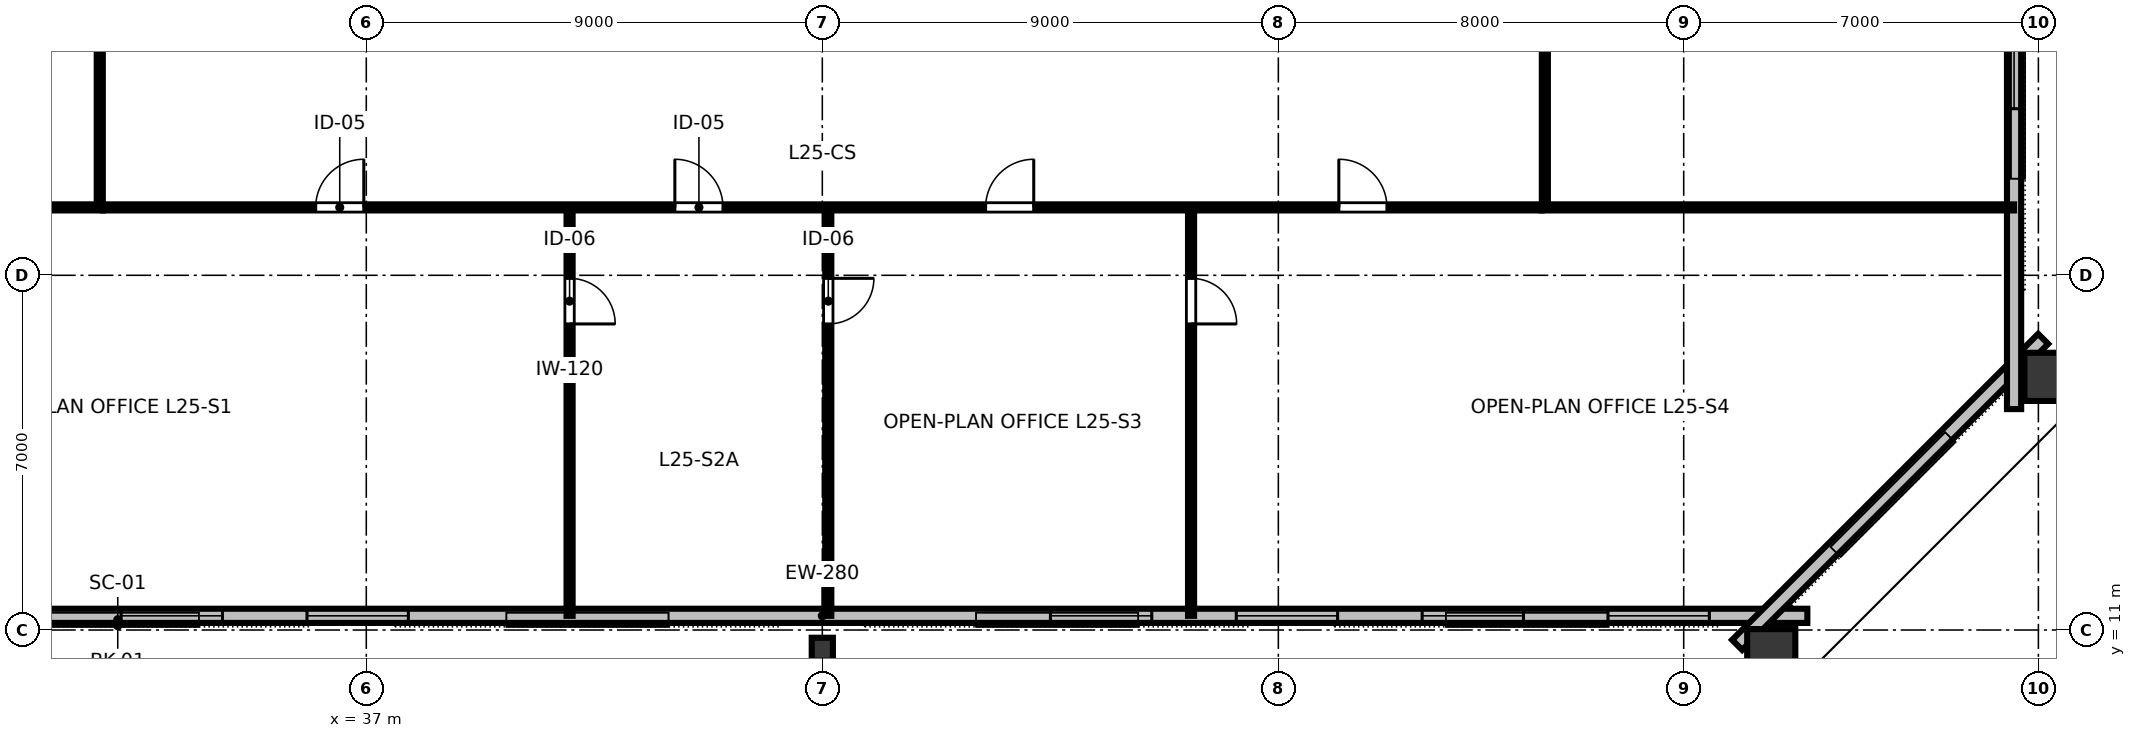
"""IFC4 building model, lengths in metres.
Left out: names, types, materials, properties, quantities, classifications, styles, units other than length and angle.
Written with IfcOpenShell. Run it as: python <this file> out.ifc"""

import sys

from ifc_helpers import new_model, si_unit, direction, frame, frame_2d, origin, origin_2d, place, context, subcontext, project, spatial, rectangle, hollow_rectangle, i_section, extrude, element, fill, save


model = new_model("IFC4")
c1 = context("Model", 3, precision=1e-05, world=origin(), true_north=direction((0.0, 1.0)))
c2 = subcontext(c1, "Body", "Model", "MODEL_VIEW")
j1 = project(units=[si_unit("LENGTHUNIT", "METRE"), si_unit("PLANEANGLEUNIT", "RADIAN")], contexts=[c1])
p1 = place(None, origin())
s1 = spatial("IfcSite", under=j1, at=p1, CompositionType="ELEMENT")
p2 = place(p1, origin())
s2 = spatial("IfcBuilding", under=s1, at=p2, CompositionType="ELEMENT")
p3 = place(p2, frame((0.0, 0.0, 98.8)))
s3 = spatial("IfcBuildingStorey", under=s2, at=p3, CompositionType="ELEMENT", Elevation=98.8)
p4 = place(p3, frame((46.0, 10.62, 0.0), z_axis=(0.0, 0.0, 1.0), x_axis=(1.0, 0.0, 0.0)))
e1 = element("IfcColumn", 1, at=p4, inside=s3, PredefinedType="COLUMN", context=c2, shape_type="SweptSolid", body=[
    extrude(i_section(OverallWidth=0.418, OverallDepth=0.455, WebThickness=0.042, FlangeThickness=0.068, FilletRadius=0.025, at=origin_2d()), origin(), (0.0, 0.0, 1.0), 3.358),
])
for number, where, z_axis, x_axis in (
    (2, (64.728, 10.444, 0.0), (0.0, 0.0, 1.0), (1.0, 0.0, 0.0)),
    (3, (70.299, 15.996, 0.0), (0.0, 0.0, 1.0), (0.0, 1.0, 0.0)),
):
    element("IfcColumn", number, at=place(p3, frame(where, z_axis=z_axis, x_axis=x_axis)), inside=s3, PredefinedType="COLUMN", context=c2, shape_type="SweptSolid", body=[
        extrude(hollow_rectangle(XDim=0.95, YDim=1.15, WallThickness=0.06, at=origin_2d()), origin(), (0.0, 0.0, 1.0), 3.358),
    ])
p5 = place(p3, frame((26.56, 11.28, 0.0), z_axis=(0.0, 0.0, 1.0), x_axis=(1.0, 0.0, 0.0)))
e4 = element("IfcWall", 4, at=p5, inside=s3, PredefinedType="STANDARD", context=c2, shape_type="SweptSolid", body=[
    extrude(rectangle(XDim=38.88, YDim=0.28, at=frame_2d((19.44, 0.0))), origin(), (0.0, 0.0, 1.0), 3.36),
])
p6 = place(p5, frame((1.934, 0.0, 0.8)))
e5 = element("IfcOpeningElement", 5, at=p6, cuts=e4, PredefinedType="OPENING", context=c2, shape_type="SweptSolid", body=[
    extrude(rectangle(XDim=2.0, YDim=1.95, at=frame_2d((1.0, 0.975))), frame((0.0, 0.15, 0.0), z_axis=(0.0, -1.0, 0.0), x_axis=(1.0, 0.0, 0.0)), (0.0, 0.0, 1.0), 0.3),
])
p7 = place(p5, frame((5.602, 0.0, 0.8)))
e6 = element("IfcOpeningElement", 6, at=p7, cuts=e4, PredefinedType="OPENING", context=c2, shape_type="SweptSolid", body=[
    extrude(rectangle(XDim=2.0, YDim=1.95, at=frame_2d((1.0, 0.975))), frame((0.0, 0.15, 0.0), z_axis=(0.0, -1.0, 0.0), x_axis=(1.0, 0.0, 0.0)), (0.0, 0.0, 1.0), 0.3),
])
p8 = place(p5, frame((9.27, 0.0, 0.8)))
e7 = element("IfcOpeningElement", 7, at=p8, cuts=e4, PredefinedType="OPENING", context=c2, shape_type="SweptSolid", body=[
    extrude(rectangle(XDim=2.0, YDim=1.95, at=frame_2d((1.0, 0.975))), frame((0.0, 0.15, 0.0), z_axis=(0.0, -1.0, 0.0), x_axis=(1.0, 0.0, 0.0)), (0.0, 0.0, 1.0), 0.3),
])
p9 = place(p5, frame((23.942, 0.0, 0.8)))
e8 = element("IfcOpeningElement", 8, at=p9, cuts=e4, PredefinedType="OPENING", context=c2, shape_type="SweptSolid", body=[
    extrude(rectangle(XDim=2.0, YDim=1.95, at=frame_2d((1.0, 0.975))), frame((0.0, 0.15, 0.0), z_axis=(0.0, -1.0, 0.0), x_axis=(1.0, 0.0, 0.0)), (0.0, 0.0, 1.0), 0.3),
])
p10 = place(p5, frame((27.61, 0.0, 0.8)))
e9 = element("IfcOpeningElement", 9, at=p10, cuts=e4, PredefinedType="OPENING", context=c2, shape_type="SweptSolid", body=[
    extrude(rectangle(XDim=2.0, YDim=1.95, at=frame_2d((1.0, 0.975))), frame((0.0, 0.15, 0.0), z_axis=(0.0, -1.0, 0.0), x_axis=(1.0, 0.0, 0.0)), (0.0, 0.0, 1.0), 0.3),
])
p11 = place(p5, frame((31.278, 0.0, 0.8)))
e10 = element("IfcOpeningElement", 10, at=p11, cuts=e4, PredefinedType="OPENING", context=c2, shape_type="SweptSolid", body=[
    extrude(rectangle(XDim=2.0, YDim=1.95, at=frame_2d((1.0, 0.975))), frame((0.0, 0.15, 0.0), z_axis=(0.0, -1.0, 0.0), x_axis=(1.0, 0.0, 0.0)), (0.0, 0.0, 1.0), 0.3),
])
p12 = place(p5, frame((34.946, 0.0, 0.8)))
e11 = element("IfcOpeningElement", 11, at=p12, cuts=e4, PredefinedType="OPENING", context=c2, shape_type="SweptSolid", body=[
    extrude(rectangle(XDim=2.0, YDim=1.95, at=frame_2d((1.0, 0.975))), frame((0.0, 0.15, 0.0), z_axis=(0.0, -1.0, 0.0), x_axis=(1.0, 0.0, 0.0)), (0.0, 0.0, 1.0), 0.3),
])
p13 = place(p3, frame((64.054, 10.706, 0.0), z_axis=(0.0, 0.0, 1.0), x_axis=(0.707106781187, 0.707106781187, 0.0)))
e12 = element("IfcWall", 12, at=p13, inside=s3, PredefinedType="STANDARD", context=c2, shape_type="SweptSolid", body=[
    extrude(rectangle(XDim=8.541, YDim=0.28, at=frame_2d((4.271, 0.0))), origin(), (0.0, 0.0, 1.0), 3.36),
])
p14 = place(p3, frame((69.52, 15.36, 0.0), z_axis=(0.0, 0.0, 1.0), x_axis=(0.0, 1.0, 0.0)))
e13 = element("IfcWall", 13, at=p14, inside=s3, PredefinedType="STANDARD", context=c2, shape_type="SweptSolid", body=[
    extrude(rectangle(XDim=33.28, YDim=0.28, at=frame_2d((16.64, 0.0))), origin(), (0.0, 0.0, 1.0), 3.36),
])
p15 = place(p14, frame((5.927, 0.0, 0.8)))
e14 = element("IfcOpeningElement", 14, at=p15, cuts=e13, PredefinedType="OPENING", context=c2, shape_type="SweptSolid", body=[
    extrude(rectangle(XDim=2.0, YDim=1.95, at=frame_2d((1.0, 0.975))), frame((0.0, 0.15, 0.0), z_axis=(0.0, -1.0, 0.0), x_axis=(1.0, 0.0, 0.0)), (0.0, 0.0, 1.0), 0.3),
])
p16 = place(p14, frame((9.812, 0.0, 0.8)))
e15 = element("IfcOpeningElement", 15, at=p16, cuts=e13, PredefinedType="OPENING", context=c2, shape_type="SweptSolid", body=[
    extrude(rectangle(XDim=2.0, YDim=1.95, at=frame_2d((1.0, 0.975))), frame((0.0, 0.15, 0.0), z_axis=(0.0, -1.0, 0.0), x_axis=(1.0, 0.0, 0.0)), (0.0, 0.0, 1.0), 0.3),
])
p17 = place(p14, frame((21.468, 0.0, 0.8)))
e16 = element("IfcOpeningElement", 16, at=p17, cuts=e13, PredefinedType="OPENING", context=c2, shape_type="SweptSolid", body=[
    extrude(rectangle(XDim=2.0, YDim=1.95, at=frame_2d((1.0, 0.975))), frame((0.0, 0.15, 0.0), z_axis=(0.0, -1.0, 0.0), x_axis=(1.0, 0.0, 0.0)), (0.0, 0.0, 1.0), 0.3),
])
p18 = place(p14, frame((25.353, 0.0, 0.8)))
e17 = element("IfcOpeningElement", 17, at=p18, cuts=e13, PredefinedType="OPENING", context=c2, shape_type="SweptSolid", body=[
    extrude(rectangle(XDim=2.0, YDim=1.95, at=frame_2d((1.0, 0.975))), frame((0.0, 0.15, 0.0), z_axis=(0.0, -1.0, 0.0), x_axis=(1.0, 0.0, 0.0)), (0.0, 0.0, 1.0), 0.3),
])
p19 = place(p3, frame((41.012, 19.34, 0.0), z_axis=(0.0, 0.0, 1.0), x_axis=(0.0, -1.0, 0.0)))
e18 = element("IfcWall", 18, at=p19, inside=s3, PredefinedType="PARTITIONING", context=c2, shape_type="SweptSolid", body=[
    extrude(rectangle(XDim=8.06, YDim=0.12, at=frame_2d((4.03, 0.0))), origin(), (0.0, 0.0, 1.0), 2.64),
])
p20 = place(p19, frame((1.4, 0.0, 0.0)))
e19 = element("IfcOpeningElement", 19, at=p20, cuts=e18, PredefinedType="OPENING", context=c2, shape_type="SweptSolid", body=[
    extrude(rectangle(XDim=0.9, YDim=2.15, at=frame_2d((0.45, 1.075))), frame((0.0, 0.07, 0.0), z_axis=(0.0, -1.0, 0.0), x_axis=(1.0, 0.0, 0.0)), (0.0, 0.0, 1.0), 0.14),
])
p21 = place(p3, frame((46.118, 19.34, 0.0), z_axis=(0.0, 0.0, 1.0), x_axis=(0.0, -1.0, 0.0)))
e20 = element("IfcWall", 20, at=p21, inside=s3, PredefinedType="PARTITIONING", context=c2, shape_type="SweptSolid", body=[
    extrude(rectangle(XDim=8.06, YDim=0.12, at=frame_2d((4.03, 0.0))), origin(), (0.0, 0.0, 1.0), 2.64),
])
p22 = place(p21, frame((1.4, 0.0, 0.0)))
e21 = element("IfcOpeningElement", 21, at=p22, cuts=e20, PredefinedType="OPENING", context=c2, shape_type="SweptSolid", body=[
    extrude(rectangle(XDim=0.9, YDim=2.15, at=frame_2d((0.45, 1.075))), frame((0.0, 0.07, 0.0), z_axis=(0.0, -1.0, 0.0), x_axis=(1.0, 0.0, 0.0)), (0.0, 0.0, 1.0), 0.14),
])
p23 = place(p3, frame((53.277, 19.34, 0.0), z_axis=(0.0, 0.0, 1.0), x_axis=(0.0, -1.0, 0.0)))
e22 = element("IfcWall", 22, at=p23, inside=s3, PredefinedType="PARTITIONING", context=c2, shape_type="SweptSolid", body=[
    extrude(rectangle(XDim=8.06, YDim=0.12, at=frame_2d((4.03, 0.0))), origin(), (0.0, 0.0, 1.0), 2.64),
])
p24 = place(p23, frame((1.4, 0.0, 0.0)))
e23 = element("IfcOpeningElement", 23, at=p24, cuts=e22, PredefinedType="OPENING", context=c2, shape_type="SweptSolid", body=[
    extrude(rectangle(XDim=0.9, YDim=2.15, at=frame_2d((0.45, 1.075))), frame((0.0, 0.07, 0.0), z_axis=(0.0, -1.0, 0.0), x_axis=(1.0, 0.0, 0.0)), (0.0, 0.0, 1.0), 0.14),
])
p25 = place(p3, frame((31.8, 19.34, 0.0), z_axis=(0.0, 0.0, 1.0), x_axis=(1.0, 0.0, 0.0)))
e24 = element("IfcWall", 24, at=p25, inside=s3, PredefinedType="PARTITIONING", context=c2, shape_type="SweptSolid", body=[
    extrude(rectangle(XDim=28.4, YDim=0.12, at=frame_2d((14.2, 0.0))), origin(), (0.0, 0.0, 1.0), 2.64),
])
p26 = place(p25, frame((4.201, 0.0, 0.0)))
e25 = element("IfcOpeningElement", 25, at=p26, cuts=e24, PredefinedType="OPENING", context=c2, shape_type="SweptSolid", body=[
    extrude(rectangle(XDim=0.95, YDim=2.15, at=frame_2d((0.475, 1.075))), frame((0.0, 0.07, 0.0), z_axis=(0.0, -1.0, 0.0), x_axis=(1.0, 0.0, 0.0)), (0.0, 0.0, 1.0), 0.14),
])
p27 = place(p25, frame((11.29, 0.0, 0.0)))
e26 = element("IfcOpeningElement", 26, at=p27, cuts=e24, PredefinedType="OPENING", context=c2, shape_type="SweptSolid", body=[
    extrude(rectangle(XDim=0.95, YDim=2.15, at=frame_2d((0.475, 1.075))), frame((0.0, 0.07, 0.0), z_axis=(0.0, -1.0, 0.0), x_axis=(1.0, 0.0, 0.0)), (0.0, 0.0, 1.0), 0.14),
])
p28 = place(p25, frame((17.423, 0.0, 0.0)))
e27 = element("IfcOpeningElement", 27, at=p28, cuts=e24, PredefinedType="OPENING", context=c2, shape_type="SweptSolid", body=[
    extrude(rectangle(XDim=0.95, YDim=2.15, at=frame_2d((0.475, 1.075))), frame((0.0, 0.07, 0.0), z_axis=(0.0, -1.0, 0.0), x_axis=(1.0, 0.0, 0.0)), (0.0, 0.0, 1.0), 0.14),
])
p29 = place(p25, frame((24.394, 0.0, 0.0)))
e28 = element("IfcOpeningElement", 28, at=p29, cuts=e24, PredefinedType="OPENING", context=c2, shape_type="SweptSolid", body=[
    extrude(rectangle(XDim=0.95, YDim=2.15, at=frame_2d((0.475, 1.075))), frame((0.0, 0.07, 0.0), z_axis=(0.0, -1.0, 0.0), x_axis=(1.0, 0.0, 0.0)), (0.0, 0.0, 1.0), 0.14),
])
p30 = place(p3, frame((31.74, 19.4, 0.0), z_axis=(0.0, 0.0, 1.0), x_axis=(0.0, 1.0, 0.0)))
e29 = element("IfcWall", 29, at=p30, inside=s3, PredefinedType="PARTITIONING", context=c2, shape_type="SweptSolid", body=[
    extrude(rectangle(XDim=11.58, YDim=0.12, at=frame_2d((5.79, 0.0))), origin(), (0.0, 0.0, 1.0), 2.64),
])
p31 = place(p30, frame((5.415, 0.0, 0.0)))
e30 = element("IfcOpeningElement", 30, at=p31, cuts=e29, PredefinedType="OPENING", context=c2, shape_type="SweptSolid", body=[
    extrude(rectangle(XDim=0.95, YDim=2.15, at=frame_2d((0.475, 1.075))), frame((0.0, 0.07, 0.0), z_axis=(0.0, -1.0, 0.0), x_axis=(1.0, 0.0, 0.0)), (0.0, 0.0, 1.0), 0.14),
])
p32 = place(p3, frame((60.26, 19.4, 0.0), z_axis=(0.0, 0.0, 1.0), x_axis=(0.0, 1.0, 0.0)))
e31 = element("IfcWall", 31, at=p32, inside=s3, PredefinedType="PARTITIONING", context=c2, shape_type="SweptSolid", body=[
    extrude(rectangle(XDim=11.58, YDim=0.12, at=frame_2d((5.79, 0.0))), origin(), (0.0, 0.0, 1.0), 2.64),
])
p33 = place(p32, frame((5.415, 0.0, 0.0)))
e32 = element("IfcOpeningElement", 32, at=p33, cuts=e31, PredefinedType="OPENING", context=c2, shape_type="SweptSolid", body=[
    extrude(rectangle(XDim=0.95, YDim=2.15, at=frame_2d((0.475, 1.075))), frame((0.0, 0.07, 0.0), z_axis=(0.0, -1.0, 0.0), x_axis=(1.0, 0.0, 0.0)), (0.0, 0.0, 1.0), 0.14),
])
for number, where, z_axis, x_axis in (
    (33, (31.8, 19.34, 0.0), (0.0, 0.0, 1.0), (-1.0, 0.0, 0.0)),
    (34, (60.2, 19.34, 0.0), (0.0, 0.0, 1.0), (1.0, 0.0, 0.0)),
):
    element("IfcWall", number, at=place(p3, frame(where, z_axis=z_axis, x_axis=x_axis)), inside=s3, PredefinedType="PARTITIONING", context=c2, shape_type="SweptSolid", body=[
        extrude(rectangle(XDim=9.32, YDim=0.12, at=frame_2d((4.66, 0.0))), origin(), (0.0, 0.0, 1.0), 2.64),
    ])
p34 = place(p7, origin())
e35 = element("IfcWindow", 35, at=p34, inside=s3, PartitioningType="SINGLE_PANEL", PredefinedType="WINDOW", context=c2, shape_type="SweptSolid", body=[
    extrude(rectangle(XDim=2.0, YDim=1.95, at=frame_2d((1.0, 0.975))), frame((0.0, 0.03, 0.0), z_axis=(0.0, -1.0, 0.0), x_axis=(1.0, 0.0, 0.0)), (0.0, 0.0, 1.0), 0.06),
])
fill(e6, e35)
p35 = place(p8, origin())
e36 = element("IfcWindow", 36, at=p35, inside=s3, PartitioningType="SINGLE_PANEL", PredefinedType="WINDOW", context=c2, shape_type="SweptSolid", body=[
    extrude(rectangle(XDim=2.0, YDim=1.95, at=frame_2d((1.0, 0.975))), frame((0.0, 0.03, 0.0), z_axis=(0.0, -1.0, 0.0), x_axis=(1.0, 0.0, 0.0)), (0.0, 0.0, 1.0), 0.06),
])
fill(e7, e36)
p36 = place(p9, origin())
e37 = element("IfcWindow", 37, at=p36, inside=s3, PartitioningType="SINGLE_PANEL", PredefinedType="WINDOW", context=c2, shape_type="SweptSolid", body=[
    extrude(rectangle(XDim=2.0, YDim=1.95, at=frame_2d((1.0, 0.975))), frame((0.0, 0.03, 0.0), z_axis=(0.0, -1.0, 0.0), x_axis=(1.0, 0.0, 0.0)), (0.0, 0.0, 1.0), 0.06),
])
fill(e8, e37)
p37 = place(p10, origin())
e38 = element("IfcWindow", 38, at=p37, inside=s3, PartitioningType="SINGLE_PANEL", PredefinedType="WINDOW", context=c2, shape_type="SweptSolid", body=[
    extrude(rectangle(XDim=2.0, YDim=1.95, at=frame_2d((1.0, 0.975))), frame((0.0, 0.03, 0.0), z_axis=(0.0, -1.0, 0.0), x_axis=(1.0, 0.0, 0.0)), (0.0, 0.0, 1.0), 0.06),
])
fill(e9, e38)
p38 = place(p11, origin())
e39 = element("IfcWindow", 39, at=p38, inside=s3, PartitioningType="SINGLE_PANEL", PredefinedType="WINDOW", context=c2, shape_type="SweptSolid", body=[
    extrude(rectangle(XDim=2.0, YDim=1.95, at=frame_2d((1.0, 0.975))), frame((0.0, 0.03, 0.0), z_axis=(0.0, -1.0, 0.0), x_axis=(1.0, 0.0, 0.0)), (0.0, 0.0, 1.0), 0.06),
])
fill(e10, e39)
p39 = place(p12, origin())
e40 = element("IfcWindow", 40, at=p39, inside=s3, PartitioningType="SINGLE_PANEL", PredefinedType="WINDOW", context=c2, shape_type="SweptSolid", body=[
    extrude(rectangle(XDim=2.0, YDim=1.95, at=frame_2d((1.0, 0.975))), frame((0.0, 0.03, 0.0), z_axis=(0.0, -1.0, 0.0), x_axis=(1.0, 0.0, 0.0)), (0.0, 0.0, 1.0), 0.06),
])
fill(e11, e40)
p40 = place(p15, origin())
e41 = element("IfcWindow", 41, at=p40, inside=s3, PartitioningType="SINGLE_PANEL", PredefinedType="WINDOW", context=c2, shape_type="SweptSolid", body=[
    extrude(rectangle(XDim=2.0, YDim=1.95, at=frame_2d((1.0, 0.975))), frame((0.0, 0.03, 0.0), z_axis=(0.0, -1.0, 0.0), x_axis=(1.0, 0.0, 0.0)), (0.0, 0.0, 1.0), 0.06),
])
fill(e14, e41)
p41 = place(p20, origin())
e42 = element("IfcDoor", 42, at=p41, inside=s3, OperationType="SINGLE_SWING_RIGHT", PredefinedType="DOOR", context=c2, shape_type="SweptSolid", body=[
    extrude(rectangle(XDim=0.9, YDim=2.15, at=frame_2d((0.45, 1.075))), frame((0.0, 0.025, 0.0), z_axis=(0.0, -1.0, 0.0), x_axis=(1.0, 0.0, 0.0)), (0.0, 0.0, 1.0), 0.05),
])
fill(e19, e42)
p42 = place(p22, origin())
e43 = element("IfcDoor", 43, at=p42, inside=s3, OperationType="SINGLE_SWING_LEFT", PredefinedType="DOOR", context=c2, shape_type="SweptSolid", body=[
    extrude(rectangle(XDim=0.9, YDim=2.15, at=frame_2d((0.45, 1.075))), frame((0.0, 0.025, 0.0), z_axis=(0.0, -1.0, 0.0), x_axis=(1.0, 0.0, 0.0)), (0.0, 0.0, 1.0), 0.05),
])
fill(e21, e43)
p43 = place(p24, origin())
e44 = element("IfcDoor", 44, at=p43, inside=s3, OperationType="SINGLE_SWING_RIGHT", PredefinedType="DOOR", context=c2, shape_type="SweptSolid", body=[
    extrude(rectangle(XDim=0.9, YDim=2.15, at=frame_2d((0.45, 1.075))), frame((0.0, 0.025, 0.0), z_axis=(0.0, -1.0, 0.0), x_axis=(1.0, 0.0, 0.0)), (0.0, 0.0, 1.0), 0.05),
])
fill(e23, e44)
p44 = place(p26, origin())
e45 = element("IfcDoor", 45, at=p44, inside=s3, OperationType="SINGLE_SWING_RIGHT", PredefinedType="DOOR", context=c2, shape_type="SweptSolid", body=[
    extrude(rectangle(XDim=0.95, YDim=2.15, at=frame_2d((0.475, 1.075))), frame((0.0, 0.025, 0.0), z_axis=(0.0, -1.0, 0.0), x_axis=(1.0, 0.0, 0.0)), (0.0, 0.0, 1.0), 0.05),
])
fill(e25, e45)
p45 = place(p27, origin())
e46 = element("IfcDoor", 46, at=p45, inside=s3, OperationType="SINGLE_SWING_LEFT", PredefinedType="DOOR", context=c2, shape_type="SweptSolid", body=[
    extrude(rectangle(XDim=0.95, YDim=2.15, at=frame_2d((0.475, 1.075))), frame((0.0, 0.025, 0.0), z_axis=(0.0, -1.0, 0.0), x_axis=(1.0, 0.0, 0.0)), (0.0, 0.0, 1.0), 0.05),
])
fill(e26, e46)
p46 = place(p28, origin())
e47 = element("IfcDoor", 47, at=p46, inside=s3, OperationType="SINGLE_SWING_RIGHT", PredefinedType="DOOR", context=c2, shape_type="SweptSolid", body=[
    extrude(rectangle(XDim=0.95, YDim=2.15, at=frame_2d((0.475, 1.075))), frame((0.0, 0.025, 0.0), z_axis=(0.0, -1.0, 0.0), x_axis=(1.0, 0.0, 0.0)), (0.0, 0.0, 1.0), 0.05),
])
fill(e27, e47)
p47 = place(p29, origin())
e48 = element("IfcDoor", 48, at=p47, inside=s3, OperationType="SINGLE_SWING_LEFT", PredefinedType="DOOR", context=c2, shape_type="SweptSolid", body=[
    extrude(rectangle(XDim=0.95, YDim=2.15, at=frame_2d((0.475, 1.075))), frame((0.0, 0.025, 0.0), z_axis=(0.0, -1.0, 0.0), x_axis=(1.0, 0.0, 0.0)), (0.0, 0.0, 1.0), 0.05),
])
fill(e28, e48)
save(model, sys.argv[1])
